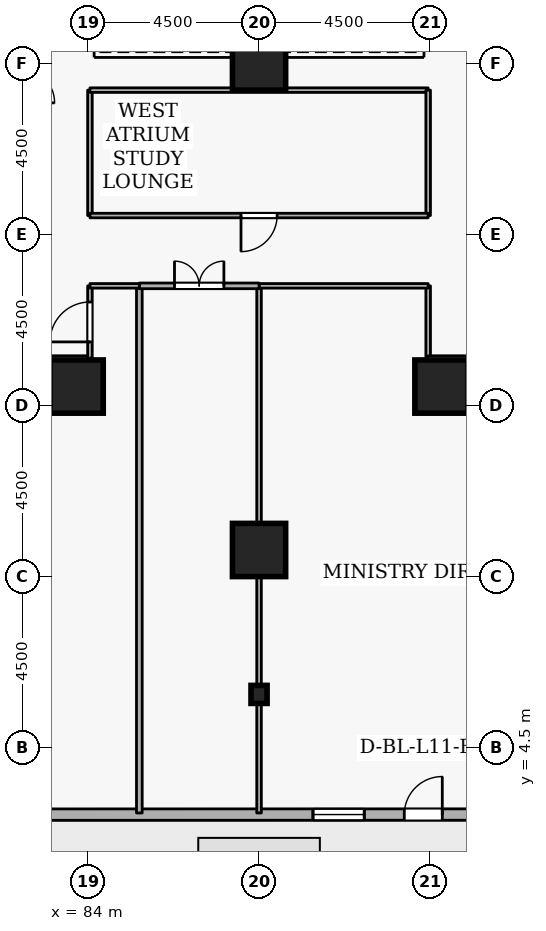
"""IFC4 building model, lengths in metres.
Left out: names, types, materials, properties, quantities, classifications, styles, units other than length and angle.
Written with IfcOpenShell. Run it as: python <this file> out.ifc"""

import sys

from ifc_helpers import new_model, si_unit, direction, frame, frame_2d, origin, origin_2d, place, context, subcontext, project, spatial, rectangle, i_section, extrude, element, fill, save


model = new_model("IFC4")
c1 = context("Model", 3, precision=1e-05, world=origin(), true_north=direction((0.0, 1.0)))
c2 = subcontext(c1, "Body", "Model", "MODEL_VIEW")
j1 = project(units=[si_unit("LENGTHUNIT", "METRE"), si_unit("PLANEANGLEUNIT", "RADIAN")], contexts=[c1])
p1 = place(None, origin())
s1 = spatial("IfcSite", under=j1, at=p1, CompositionType="ELEMENT")
p2 = place(p1, origin())
s2 = spatial("IfcBuilding", under=s1, at=p2, CompositionType="ELEMENT")
p3 = place(p2, frame((0.0, 0.0, 45.9)))
s3 = spatial("IfcBuildingStorey", under=s2, at=p3, CompositionType="ELEMENT", Elevation=45.9)
for number, where, z_axis, x_axis in (
    (1, (88.5, 9.7, 0.0), (0.0, 0.0, 1.0), (1.0, 0.0, 0.0)),
    (2, (93.3, 14.0, 0.0), (0.0, 0.0, 1.0), (1.0, 0.0, 0.0)),
    (3, (83.7, 14.0, 0.0), (0.0, 0.0, 1.0), (1.0, 0.0, 0.0)),
    (4, (88.5, 22.5, 0.0), (0.0, 0.0, 1.0), (1.0, 0.0, 0.0)),
):
    element("IfcColumn", number, at=place(p3, frame(where, z_axis=z_axis, x_axis=x_axis)), inside=s3, PredefinedType="COLUMN", context=c2, shape_type="SweptSolid", body=[
        extrude(rectangle(XDim=1.4, YDim=1.4, at=origin_2d()), origin(), (0.0, 0.0, 1.0), 3.6),
    ])
p4 = place(p3, frame((88.5, 5.9, 0.0), z_axis=(0.0, 0.0, 1.0), x_axis=(1.0, 0.0, 0.0)))
e5 = element("IfcColumn", 5, at=p4, inside=s3, PredefinedType="COLUMN", context=c2, shape_type="SweptSolid", body=[
    extrude(i_section(OverallWidth=0.424, OverallDepth=0.475, WebThickness=0.048, FlangeThickness=0.077, FilletRadius=0.015, at=origin_2d()), origin(), (0.0, 0.0, 1.0), 3.6),
])
p5 = place(p3, frame((72.819, 2.735, 0.0), z_axis=(0.0, 0.0, 1.0), x_axis=(0.999999983929, 0.00017928314, 0.0)))
e6 = element("IfcWall", 6, at=p5, inside=s3, PredefinedType="STANDARD", context=c2, shape_type="SweptSolid", body=[
    extrude(rectangle(XDim=35.406, YDim=0.3, at=frame_2d((17.703, 0.0))), origin(), (0.0, 0.0, 1.0), 2.22),
])
p6 = place(p5, frame((19.503, 0.0, 0.0)))
e7 = element("IfcOpeningElement", 7, at=p6, cuts=e6, PredefinedType="OPENING", context=c2, shape_type="SweptSolid", body=[
    extrude(rectangle(XDim=1.0, YDim=2.08, at=frame_2d((0.5, 1.04))), frame((0.0, 0.16, 0.0), z_axis=(0.0, -1.0, 0.0), x_axis=(1.0, 0.0, 0.0)), (0.0, 0.0, 1.0), 0.32),
])
p7 = place(p5, frame((2.7, 0.0, 0.72)))
e8 = element("IfcOpeningElement", 8, at=p7, cuts=e6, PredefinedType="OPENING", context=c2, shape_type="SweptSolid", body=[
    extrude(rectangle(XDim=1.35, YDim=1.05, at=frame_2d((0.675, 0.525))), frame((0.0, 0.16, 0.0), z_axis=(0.0, -1.0, 0.0), x_axis=(1.0, 0.0, 0.0)), (0.0, 0.0, 1.0), 0.32),
])
p8 = place(p5, frame((7.5, 0.0, 0.72)))
e9 = element("IfcOpeningElement", 9, at=p8, cuts=e6, PredefinedType="OPENING", context=c2, shape_type="SweptSolid", body=[
    extrude(rectangle(XDim=1.35, YDim=1.05, at=frame_2d((0.675, 0.525))), frame((0.0, 0.16, 0.0), z_axis=(0.0, -1.0, 0.0), x_axis=(1.0, 0.0, 0.0)), (0.0, 0.0, 1.0), 0.32),
])
p9 = place(p5, frame((17.1, 0.0, 0.72)))
e10 = element("IfcOpeningElement", 10, at=p9, cuts=e6, PredefinedType="OPENING", context=c2, shape_type="SweptSolid", body=[
    extrude(rectangle(XDim=1.35, YDim=1.05, at=frame_2d((0.675, 0.525))), frame((0.0, 0.16, 0.0), z_axis=(0.0, -1.0, 0.0), x_axis=(1.0, 0.0, 0.0)), (0.0, 0.0, 1.0), 0.32),
])
p10 = place(p5, frame((21.9, 0.0, 0.72)))
e11 = element("IfcOpeningElement", 11, at=p10, cuts=e6, PredefinedType="OPENING", context=c2, shape_type="SweptSolid", body=[
    extrude(rectangle(XDim=1.35, YDim=1.05, at=frame_2d((0.675, 0.525))), frame((0.0, 0.16, 0.0), z_axis=(0.0, -1.0, 0.0), x_axis=(1.0, 0.0, 0.0)), (0.0, 0.0, 1.0), 0.32),
])
p11 = place(p5, frame((26.7, 0.0, 0.72)))
e12 = element("IfcOpeningElement", 12, at=p11, cuts=e6, PredefinedType="OPENING", context=c2, shape_type="SweptSolid", body=[
    extrude(rectangle(XDim=1.35, YDim=1.05, at=frame_2d((0.675, 0.525))), frame((0.0, 0.16, 0.0), z_axis=(0.0, -1.0, 0.0), x_axis=(1.0, 0.0, 0.0)), (0.0, 0.0, 1.0), 0.32),
])
p12 = place(p3, frame((92.95, 16.65, 0.0), z_axis=(0.0, 0.0, 1.0), x_axis=(0.0, -1.0, 0.0)))
e13 = element("IfcWall", 13, at=p12, inside=s3, PredefinedType="PARTITIONING", context=c2, shape_type="SweptSolid", body=[
    extrude(rectangle(XDim=1.9, YDim=0.12, at=frame_2d((0.95, 0.0))), origin(), (0.0, 0.0, 1.0), 3.26),
])
p13 = place(p3, frame((92.95, 14.75, 0.0), z_axis=(0.0, 0.0, 1.0), x_axis=(1.0, 0.0, 0.0)))
e14 = element("IfcWall", 14, at=p13, inside=s3, PredefinedType="PARTITIONING", context=c2, shape_type="SweptSolid", body=[
    extrude(rectangle(XDim=1.85, YDim=0.12, at=frame_2d((0.925, 0.0))), origin(), (0.0, 0.0, 1.0), 3.26),
])
p14 = place(p3, frame((88.5, 2.78, 0.0), z_axis=(0.0, 0.0, 1.0), x_axis=(0.0, 1.0, 0.0)))
e15 = element("IfcWall", 15, at=p14, inside=s3, PredefinedType="PARTITIONING", context=c2, shape_type="SweptSolid", body=[
    extrude(rectangle(XDim=13.87, YDim=0.12, at=frame_2d((6.935, 0.0))), origin(), (0.0, 0.0, 1.0), 2.802),
])
p15 = place(p3, frame((88.5, 16.65, 0.0), z_axis=(0.0, 0.0, 1.0), x_axis=(1.0, 0.0, 0.0)))
e16 = element("IfcWall", 16, at=p15, inside=s3, PredefinedType="PARTITIONING", context=c2, shape_type="SweptSolid", body=[
    extrude(rectangle(XDim=4.45, YDim=0.12, at=frame_2d((2.225, 0.0))), origin(), (0.0, 0.0, 1.0), 3.26),
])
p16 = place(p3, frame((85.35, 2.78, 0.0), z_axis=(0.0, 0.0, 1.0), x_axis=(0.0, 1.0, 0.0)))
e17 = element("IfcWall", 17, at=p16, inside=s3, PredefinedType="PARTITIONING", context=c2, shape_type="SweptSolid", body=[
    extrude(rectangle(XDim=13.87, YDim=0.15, at=frame_2d((6.935, 0.0))), origin(), (0.0, 0.0, 1.0), 3.26),
])
p17 = place(p3, frame((85.35, 16.65, 0.0), z_axis=(0.0, 0.0, 1.0), x_axis=(1.0, 0.0, 0.0)))
e18 = element("IfcWall", 18, at=p17, inside=s3, PredefinedType="PARTITIONING", context=c2, shape_type="SweptSolid", body=[
    extrude(rectangle(XDim=3.15, YDim=0.15, at=frame_2d((1.575, 0.0))), origin(), (0.0, 0.0, 1.0), 3.26),
])
p18 = place(p17, frame((0.925, 0.0, 0.0)))
e19 = element("IfcOpeningElement", 19, at=p18, cuts=e18, PredefinedType="OPENING", context=c2, shape_type="SweptSolid", body=[
    extrude(rectangle(XDim=1.3, YDim=2.12, at=frame_2d((0.65, 1.06))), frame((0.0, 0.085, 0.0), z_axis=(0.0, -1.0, 0.0), x_axis=(1.0, 0.0, 0.0)), (0.0, 0.0, 1.0), 0.17),
])
p19 = place(p3, frame((82.2, 14.75, 0.0), z_axis=(0.0, 0.0, 1.0), x_axis=(1.0, 0.0, 0.0)))
e20 = element("IfcWall", 20, at=p19, inside=s3, PredefinedType="PARTITIONING", context=c2, shape_type="SweptSolid", body=[
    extrude(rectangle(XDim=1.85, YDim=0.12, at=frame_2d((0.925, 0.0))), origin(), (0.0, 0.0, 1.0), 3.26),
])
p20 = place(p3, frame((84.05, 14.75, 0.0), z_axis=(0.0, 0.0, 1.0), x_axis=(0.0, 1.0, 0.0)))
e21 = element("IfcWall", 21, at=p20, inside=s3, PredefinedType="PARTITIONING", context=c2, shape_type="SweptSolid", body=[
    extrude(rectangle(XDim=1.9, YDim=0.12, at=frame_2d((0.95, 0.0))), origin(), (0.0, 0.0, 1.0), 3.26),
])
p21 = place(p20, frame((0.425, 0.0, 0.0)))
e22 = element("IfcOpeningElement", 22, at=p21, cuts=e21, PredefinedType="OPENING", context=c2, shape_type="SweptSolid", body=[
    extrude(rectangle(XDim=1.05, YDim=2.1, at=frame_2d((0.525, 1.05))), frame((0.0, 0.07, 0.0), z_axis=(0.0, -1.0, 0.0), x_axis=(1.0, 0.0, 0.0)), (0.0, 0.0, 1.0), 0.14),
])
p22 = place(p3, frame((84.05, 16.65, 0.0), z_axis=(0.0, 0.0, 1.0), x_axis=(1.0, 0.0, 0.0)))
e23 = element("IfcWall", 23, at=p22, inside=s3, PredefinedType="PARTITIONING", context=c2, shape_type="SweptSolid", body=[
    extrude(rectangle(XDim=1.3, YDim=0.12, at=frame_2d((0.65, 0.0))), origin(), (0.0, 0.0, 1.0), 3.26),
])
p23 = place(p3, frame((84.05, 18.5, 0.0), z_axis=(0.0, 0.0, 1.0), x_axis=(0.0, 1.0, 0.0)))
e24 = element("IfcWall", 24, at=p23, inside=s3, PredefinedType="PARTITIONING", context=c2, shape_type="SweptSolid", body=[
    extrude(rectangle(XDim=3.3, YDim=0.12, at=frame_2d((1.65, 0.0))), origin(), (0.0, 0.0, 1.0), 3.26),
])
p24 = place(p3, frame((84.05, 21.8, 0.0), z_axis=(0.0, 0.0, 1.0), x_axis=(1.0, 0.0, 0.0)))
e25 = element("IfcWall", 25, at=p24, inside=s3, PredefinedType="PARTITIONING", context=c2, shape_type="SweptSolid", body=[
    extrude(rectangle(XDim=8.9, YDim=0.12, at=frame_2d((4.45, 0.0))), origin(), (0.0, 0.0, 1.0), 3.26),
])
p25 = place(p3, frame((92.95, 21.8, 0.0), z_axis=(0.0, 0.0, 1.0), x_axis=(0.0, -1.0, 0.0)))
e26 = element("IfcWall", 26, at=p25, inside=s3, PredefinedType="PARTITIONING", context=c2, shape_type="SweptSolid", body=[
    extrude(rectangle(XDim=3.3, YDim=0.12, at=frame_2d((1.65, 0.0))), origin(), (0.0, 0.0, 1.0), 3.26),
])
p26 = place(p3, frame((92.95, 18.5, 0.0), z_axis=(0.0, 0.0, 1.0), x_axis=(-1.0, 0.0, 0.0)))
e27 = element("IfcWall", 27, at=p26, inside=s3, PredefinedType="PARTITIONING", context=c2, shape_type="SweptSolid", body=[
    extrude(rectangle(XDim=8.9, YDim=0.12, at=frame_2d((4.45, 0.0))), origin(), (0.0, 0.0, 1.0), 3.26),
])
p27 = place(p26, frame((3.975, 0.0, 0.0)))
e28 = element("IfcOpeningElement", 28, at=p27, cuts=e27, PredefinedType="OPENING", context=c2, shape_type="SweptSolid", body=[
    extrude(rectangle(XDim=0.95, YDim=2.1, at=frame_2d((0.475, 1.05))), frame((0.0, 0.07, 0.0), z_axis=(0.0, -1.0, 0.0), x_axis=(1.0, 0.0, 0.0)), (0.0, 0.0, 1.0), 0.14),
])
p28 = place(p6, origin())
e29 = element("IfcDoor", 29, at=p28, inside=s3, OperationType="SINGLE_SWING_RIGHT", PredefinedType="DOOR", context=c2, shape_type="SweptSolid", body=[
    extrude(rectangle(XDim=1.0, YDim=2.08, at=frame_2d((0.5, 1.04))), frame((0.0, 0.025, 0.0), z_axis=(0.0, -1.0, 0.0), x_axis=(1.0, 0.0, 0.0)), (0.0, 0.0, 1.0), 0.05),
])
fill(e7, e29)
p29 = place(p9, origin())
e30 = element("IfcWindow", 30, at=p29, inside=s3, PartitioningType="SINGLE_PANEL", PredefinedType="WINDOW", context=c2, shape_type="SweptSolid", body=[
    extrude(rectangle(XDim=1.35, YDim=1.05, at=frame_2d((0.675, 0.525))), frame((0.0, 0.03, 0.0), z_axis=(0.0, -1.0, 0.0), x_axis=(1.0, 0.0, 0.0)), (0.0, 0.0, 1.0), 0.06),
])
fill(e10, e30)
p30 = place(p18, origin())
e31 = element("IfcDoor", 31, at=p30, inside=s3, OperationType="DOUBLE_DOOR_SINGLE_SWING", PredefinedType="DOOR", context=c2, shape_type="SweptSolid", body=[
    extrude(rectangle(XDim=1.3, YDim=2.12, at=frame_2d((0.65, 1.06))), frame((0.0, 0.025, 0.0), z_axis=(0.0, -1.0, 0.0), x_axis=(1.0, 0.0, 0.0)), (0.0, 0.0, 1.0), 0.05),
])
fill(e19, e31)
p31 = place(p21, origin())
e32 = element("IfcDoor", 32, at=p31, inside=s3, OperationType="SINGLE_SWING_LEFT", PredefinedType="DOOR", context=c2, shape_type="SweptSolid", body=[
    extrude(rectangle(XDim=1.05, YDim=2.1, at=frame_2d((0.525, 1.05))), frame((0.0, 0.025, 0.0), z_axis=(0.0, -1.0, 0.0), x_axis=(1.0, 0.0, 0.0)), (0.0, 0.0, 1.0), 0.05),
])
fill(e22, e32)
p32 = place(p27, origin())
e33 = element("IfcDoor", 33, at=p32, inside=s3, OperationType="SINGLE_SWING_RIGHT", PredefinedType="DOOR", context=c2, shape_type="SweptSolid", body=[
    extrude(rectangle(XDim=0.95, YDim=2.1, at=frame_2d((0.475, 1.05))), frame((0.0, 0.025, 0.0), z_axis=(0.0, -1.0, 0.0), x_axis=(1.0, 0.0, 0.0)), (0.0, 0.0, 1.0), 0.05),
])
fill(e28, e33)
save(model, sys.argv[1])
